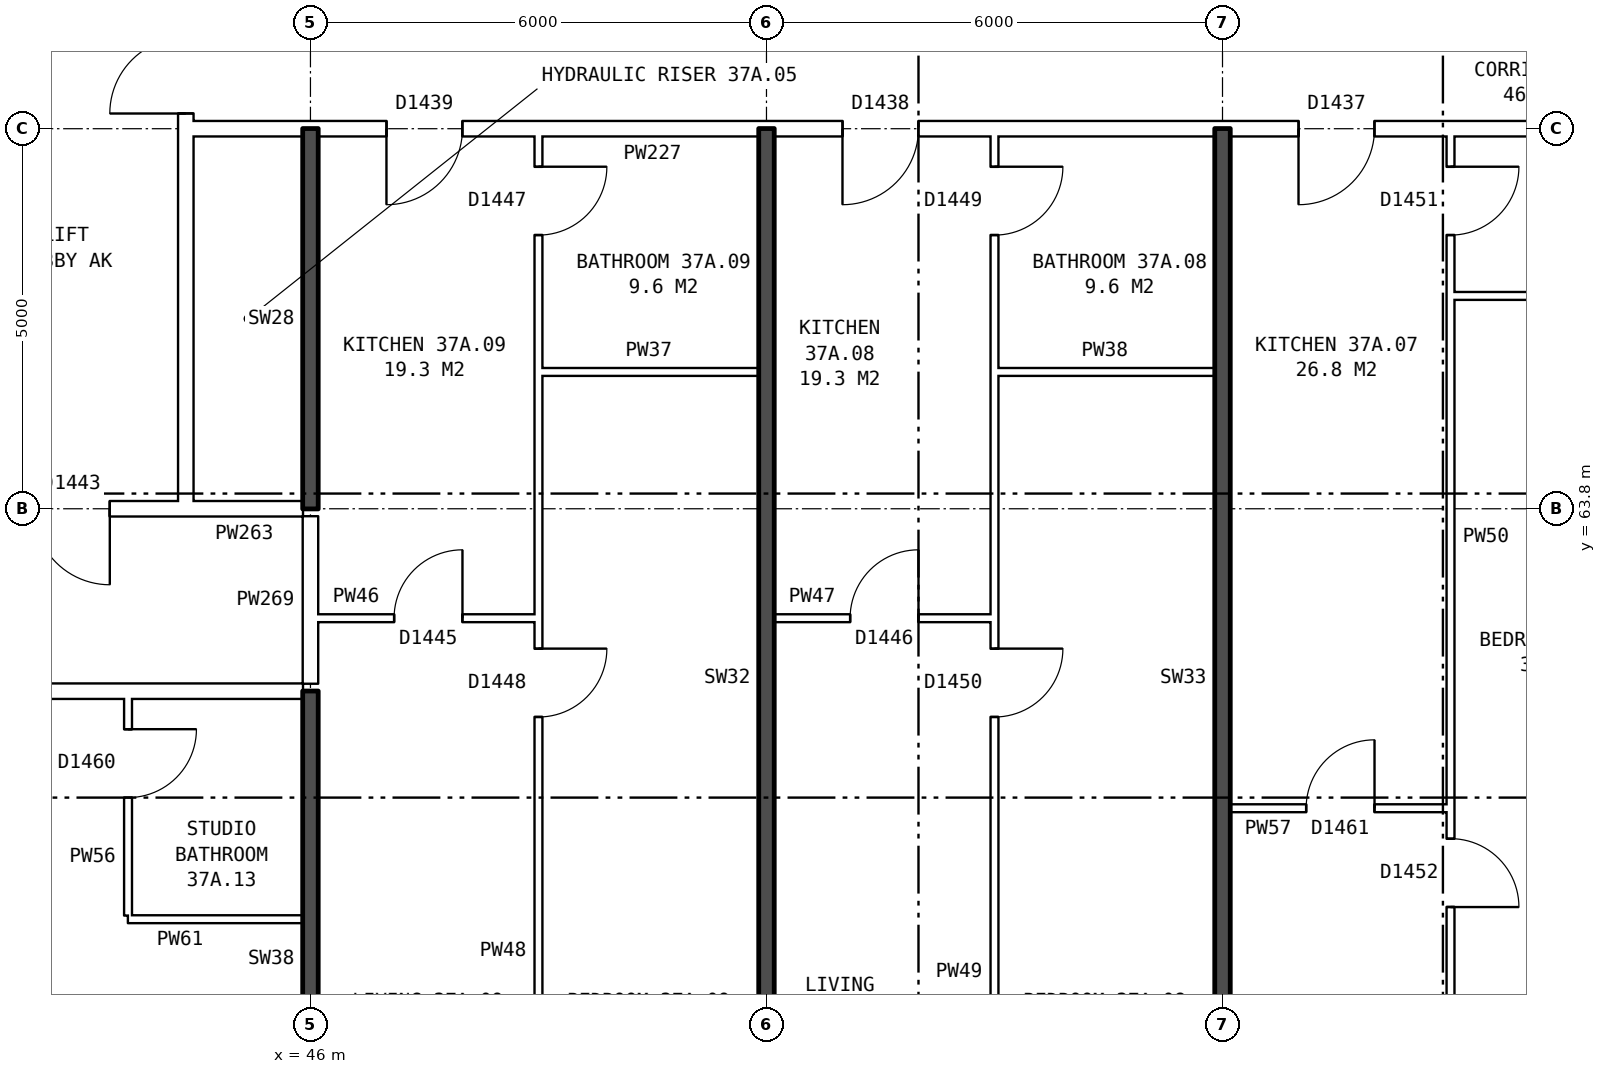
"""IFC4 building model, lengths in metres.
Left out: names, types, materials, properties, quantities, classifications, styles, units other than length and angle.
Written with IfcOpenShell. Run it as: python <this file> out.ifc"""

import sys

from ifc_helpers import new_model, si_unit, direction, frame, frame_2d, origin, place, context, subcontext, project, spatial, rectangle, extrude, element, fill, save


model = new_model("IFC4")
c1 = context("Model", 3, precision=1e-05, world=origin(), true_north=direction((0.0, 1.0)))
c2 = subcontext(c1, "Body", "Model", "MODEL_VIEW")
j1 = project(units=[si_unit("LENGTHUNIT", "METRE"), si_unit("PLANEANGLEUNIT", "RADIAN")], contexts=[c1])
p1 = place(None, origin())
s1 = spatial("IfcSite", under=j1, at=p1, CompositionType="ELEMENT")
p2 = place(p1, origin())
s2 = spatial("IfcBuilding", under=s1, at=p2, CompositionType="ELEMENT")
p3 = place(p2, frame((0.0, 0.0, 133.0)))
s3 = spatial("IfcBuildingStorey", under=s2, at=p3, CompositionType="ELEMENT", Elevation=133.0)
p4 = place(p3, frame((44.36, 63.9, 0.0), z_axis=(0.0, 0.0, 1.0), x_axis=(0.0, 1.0, 0.0)))
e1 = element("IfcWall", 1, at=p4, inside=s3, PredefinedType="PARTITIONING", context=c2, shape_type="SweptSolid", body=[
    extrude(rectangle(XDim=12.2, YDim=0.2, at=frame_2d((6.1, 0.0))), origin(), (0.0, 0.0, 1.0), 2.85),
])
p5 = place(p4, frame((5.1, 0.0, 0.0)))
e2 = element("IfcOpeningElement", 2, at=p5, cuts=e1, PredefinedType="OPENING", context=c2, shape_type="SweptSolid", body=[
    extrude(rectangle(XDim=2.0, YDim=2.1, at=frame_2d((1.0, 1.05))), frame((0.0, 0.11, 0.0), z_axis=(0.0, -1.0, 0.0), x_axis=(1.0, 0.0, 0.0)), (0.0, 0.0, 1.0), 0.22),
])
p6 = place(p3, frame((43.6, 58.4, 0.0), z_axis=(0.0, 0.0, 1.0), x_axis=(1.0, 0.0, 0.0)))
e3 = element("IfcWall", 3, at=p6, inside=s3, PredefinedType="PARTITIONING", context=c2, shape_type="SweptSolid", body=[
    extrude(rectangle(XDim=2.3, YDim=0.1, at=frame_2d((1.15, 0.0))), origin(), (0.0, 0.0, 1.0), 2.85),
])
p7 = place(p3, frame((58.1, 59.86, 0.0), z_axis=(0.0, 0.0, 1.0), x_axis=(1.0, 0.0, 0.0)))
e4 = element("IfcWall", 4, at=p7, inside=s3, PredefinedType="PARTITIONING", context=c2, shape_type="SweptSolid", body=[
    extrude(rectangle(XDim=2.9, YDim=0.1, at=frame_2d((1.45, 0.0))), origin(), (0.0, 0.0, 1.0), 2.85),
])
p8 = place(p7, frame((1.0, 0.0, 0.0)))
e5 = element("IfcOpeningElement", 5, at=p8, cuts=e4, PredefinedType="OPENING", context=c2, shape_type="SweptSolid", body=[
    extrude(rectangle(XDim=0.9, YDim=2.1, at=frame_2d((0.45, 1.05))), frame((0.0, 0.06, 0.0), z_axis=(0.0, -1.0, 0.0), x_axis=(1.0, 0.0, 0.0)), (0.0, 0.0, 1.0), 0.12),
])
p9 = place(p3, frame((27.11, 61.4, 0.0), z_axis=(0.0, 0.0, 1.0), x_axis=(1.0, 0.0, 0.0)))
e6 = element("IfcWall", 6, at=p9, inside=s3, PredefinedType="PARTITIONING", context=c2, shape_type="SweptSolid", body=[
    extrude(rectangle(XDim=18.79, YDim=0.2, at=frame_2d((9.395, 0.0))), origin(), (0.0, 0.0, 1.0), 2.85),
])
p10 = place(p9, frame((14.19, 0.0, 0.0)))
e7 = element("IfcOpeningElement", 7, at=p10, cuts=e6, PredefinedType="OPENING", context=c2, shape_type="SweptSolid", body=[
    extrude(rectangle(XDim=1.0, YDim=2.1, at=frame_2d((0.5, 1.05))), frame((0.0, 0.11, 0.0), z_axis=(0.0, -1.0, 0.0), x_axis=(1.0, 0.0, 0.0)), (0.0, 0.0, 1.0), 0.22),
])
p11 = place(p9, frame((8.19, 0.0, 0.0)))
e8 = element("IfcOpeningElement", 8, at=p11, cuts=e6, PredefinedType="OPENING", context=c2, shape_type="SweptSolid", body=[
    extrude(rectangle(XDim=1.0, YDim=2.1, at=frame_2d((0.5, 1.05))), frame((0.0, 0.11, 0.0), z_axis=(0.0, -1.0, 0.0), x_axis=(1.0, 0.0, 0.0)), (0.0, 0.0, 1.0), 0.22),
])
p12 = place(p9, frame((4.59, 0.0, 0.0)))
e9 = element("IfcOpeningElement", 9, at=p12, cuts=e6, PredefinedType="OPENING", context=c2, shape_type="SweptSolid", body=[
    extrude(rectangle(XDim=1.0, YDim=2.1, at=frame_2d((0.5, 1.05))), frame((0.0, 0.11, 0.0), z_axis=(0.0, -1.0, 0.0), x_axis=(1.0, 0.0, 0.0)), (0.0, 0.0, 1.0), 0.22),
])
p13 = place(p3, frame((46.1, 62.36, 0.0), z_axis=(0.0, 0.0, 1.0), x_axis=(1.0, 0.0, 0.0)))
e10 = element("IfcWall", 10, at=p13, inside=s3, PredefinedType="PARTITIONING", context=c2, shape_type="SweptSolid", body=[
    extrude(rectangle(XDim=2.9, YDim=0.1, at=frame_2d((1.45, 0.0))), origin(), (0.0, 0.0, 1.0), 2.85),
])
p14 = place(p13, frame((1.0, 0.0, 0.0)))
e11 = element("IfcOpeningElement", 11, at=p14, cuts=e10, PredefinedType="OPENING", context=c2, shape_type="SweptSolid", body=[
    extrude(rectangle(XDim=0.9, YDim=2.1, at=frame_2d((0.45, 1.05))), frame((0.0, 0.06, 0.0), z_axis=(0.0, -1.0, 0.0), x_axis=(1.0, 0.0, 0.0)), (0.0, 0.0, 1.0), 0.12),
])
p15 = place(p3, frame((52.1, 62.36, 0.0), z_axis=(0.0, 0.0, 1.0), x_axis=(1.0, 0.0, 0.0)))
e12 = element("IfcWall", 12, at=p15, inside=s3, PredefinedType="PARTITIONING", context=c2, shape_type="SweptSolid", body=[
    extrude(rectangle(XDim=2.9, YDim=0.1, at=frame_2d((1.45, 0.0))), origin(), (0.0, 0.0, 1.0), 2.85),
])
p16 = place(p15, frame((1.0, 0.0, 0.0)))
e13 = element("IfcOpeningElement", 13, at=p16, cuts=e12, PredefinedType="OPENING", context=c2, shape_type="SweptSolid", body=[
    extrude(rectangle(XDim=0.9, YDim=2.1, at=frame_2d((0.45, 1.05))), frame((0.0, 0.06, 0.0), z_axis=(0.0, -1.0, 0.0), x_axis=(1.0, 0.0, 0.0)), (0.0, 0.0, 1.0), 0.12),
])
p17 = place(p3, frame((41.36, 63.8, 0.0), z_axis=(0.0, 0.0, 1.0), x_axis=(1.0, 0.0, 0.0)))
e14 = element("IfcWall", 14, at=p17, inside=s3, PredefinedType="PARTITIONING", context=c2, shape_type="SweptSolid", body=[
    extrude(rectangle(XDim=3.0, YDim=0.2, at=frame_2d((1.5, 0.0))), origin(), (0.0, 0.0, 1.0), 2.85),
])
p18 = place(p17, frame((1.0, 0.0, 0.0)))
e15 = element("IfcOpeningElement", 15, at=p18, cuts=e14, PredefinedType="OPENING", context=c2, shape_type="SweptSolid", body=[
    extrude(rectangle(XDim=1.0, YDim=2.1, at=frame_2d((0.5, 1.05))), frame((0.0, 0.11, 0.0), z_axis=(0.0, -1.0, 0.0), x_axis=(1.0, 0.0, 0.0)), (0.0, 0.0, 1.0), 0.22),
])
p19 = place(p3, frame((44.36, 63.8, 0.0), z_axis=(0.0, 0.0, 1.0), x_axis=(1.0, 0.0, 0.0)))
e16 = element("IfcWall", 16, at=p19, inside=s3, PredefinedType="PARTITIONING", context=c2, shape_type="SweptSolid", body=[
    extrude(rectangle(XDim=1.54, YDim=0.2, at=frame_2d((0.77, 0.0))), origin(), (0.0, 0.0, 1.0), 2.85),
])
for number, where, z_axis, x_axis in (
    (17, (49.0, 65.6, 0.0), (0.0, 0.0, 1.0), (1.0, 0.0, 0.0)),
    (18, (55.0, 65.6, 0.0), (0.0, 0.0, 1.0), (1.0, 0.0, 0.0)),
):
    element("IfcWall", number, at=place(p3, frame(where, z_axis=z_axis, x_axis=x_axis)), inside=s3, PredefinedType="PARTITIONING", context=c2, shape_type="SweptSolid", body=[
        extrude(rectangle(XDim=2.9, YDim=0.1, at=frame_2d((1.45, 0.0))), origin(), (0.0, 0.0, 1.0), 2.85),
    ])
p20 = place(p3, frame((61.0, 66.6, 0.0), z_axis=(0.0, 0.0, 1.0), x_axis=(1.0, 0.0, 0.0)))
e19 = element("IfcWall", 19, at=p20, inside=s3, PredefinedType="PARTITIONING", context=c2, shape_type="SweptSolid", body=[
    extrude(rectangle(XDim=2.64, YDim=0.1, at=frame_2d((1.32, 0.0))), origin(), (0.0, 0.0, 1.0), 2.85),
])
p21 = place(p3, frame((44.36, 68.8, 0.0), z_axis=(0.0, 0.0, 1.0), x_axis=(1.0, 0.0, 0.0)))
e20 = element("IfcWall", 20, at=p21, inside=s3, PredefinedType="PARTITIONING", context=c2, shape_type="SweptSolid", body=[
    extrude(rectangle(XDim=19.28, YDim=0.2, at=frame_2d((9.64, 0.0))), origin(), (0.0, 0.0, 1.0), 2.85),
])
p22 = place(p21, frame((14.64, 0.0, 0.0)))
e21 = element("IfcOpeningElement", 21, at=p22, cuts=e20, PredefinedType="OPENING", context=c2, shape_type="SweptSolid", body=[
    extrude(rectangle(XDim=1.0, YDim=2.1, at=frame_2d((0.5, 1.05))), frame((0.0, 0.11, 0.0), z_axis=(0.0, -1.0, 0.0), x_axis=(1.0, 0.0, 0.0)), (0.0, 0.0, 1.0), 0.22),
])
p23 = place(p21, frame((8.64, 0.0, 0.0)))
e22 = element("IfcOpeningElement", 22, at=p23, cuts=e20, PredefinedType="OPENING", context=c2, shape_type="SweptSolid", body=[
    extrude(rectangle(XDim=1.0, YDim=2.1, at=frame_2d((0.5, 1.05))), frame((0.0, 0.11, 0.0), z_axis=(0.0, -1.0, 0.0), x_axis=(1.0, 0.0, 0.0)), (0.0, 0.0, 1.0), 0.22),
])
p24 = place(p21, frame((2.64, 0.0, 0.0)))
e23 = element("IfcOpeningElement", 23, at=p24, cuts=e20, PredefinedType="OPENING", context=c2, shape_type="SweptSolid", body=[
    extrude(rectangle(XDim=1.0, YDim=2.1, at=frame_2d((0.5, 1.05))), frame((0.0, 0.11, 0.0), z_axis=(0.0, -1.0, 0.0), x_axis=(1.0, 0.0, 0.0)), (0.0, 0.0, 1.0), 0.22),
])
p25 = place(p3, frame((43.6, 58.45, 0.0), z_axis=(0.0, 0.0, 1.0), x_axis=(0.0, 1.0, 0.0)))
e24 = element("IfcWall", 24, at=p25, inside=s3, PredefinedType="PARTITIONING", context=c2, shape_type="SweptSolid", body=[
    extrude(rectangle(XDim=2.85, YDim=0.1, at=frame_2d((1.425, 0.0))), origin(), (0.0, 0.0, 1.0), 2.85),
])
p26 = place(p25, frame((1.55, 0.0, 0.0)))
e25 = element("IfcOpeningElement", 25, at=p26, cuts=e24, PredefinedType="OPENING", context=c2, shape_type="SweptSolid", body=[
    extrude(rectangle(XDim=0.9, YDim=2.1, at=frame_2d((0.45, 1.05))), frame((0.0, 0.06, 0.0), z_axis=(0.0, -1.0, 0.0), x_axis=(1.0, 0.0, 0.0)), (0.0, 0.0, 1.0), 0.12),
])
p27 = place(p3, frame((46.0, 54.36, 0.0), z_axis=(0.0, 0.0, 1.0), x_axis=(0.0, 1.0, 0.0)))
e26 = element("IfcWall", 26, at=p27, inside=s3, PredefinedType="SOLIDWALL", context=c2, shape_type="SweptSolid", body=[
    extrude(rectangle(XDim=7.04, YDim=0.2, at=frame_2d((3.52, 0.0))), origin(), (0.0, 0.0, 1.0), 2.85),
])
p28 = place(p3, frame((46.0, 61.5, 0.0), z_axis=(0.0, 0.0, 1.0), x_axis=(0.0, 1.0, 0.0)))
e27 = element("IfcWall", 27, at=p28, inside=s3, PredefinedType="PARTITIONING", context=c2, shape_type="SweptSolid", body=[
    extrude(rectangle(XDim=2.2, YDim=0.2, at=frame_2d((1.1, 0.0))), origin(), (0.0, 0.0, 1.0), 2.85),
])
p29 = place(p3, frame((46.0, 63.8, 0.0), z_axis=(0.0, 0.0, 1.0), x_axis=(0.0, 1.0, 0.0)))
e28 = element("IfcWall", 28, at=p29, inside=s3, PredefinedType="SOLIDWALL", context=c2, shape_type="SweptSolid", body=[
    extrude(rectangle(XDim=5.0, YDim=0.2, at=frame_2d((2.5, 0.0))), origin(), (0.0, 0.0, 1.0), 2.85),
])
p30 = place(p3, frame((49.0, 54.36, 0.0), z_axis=(0.0, 0.0, 1.0), x_axis=(0.0, 1.0, 0.0)))
e29 = element("IfcWall", 29, at=p30, inside=s3, PredefinedType="PARTITIONING", context=c2, shape_type="SweptSolid", body=[
    extrude(rectangle(XDim=14.34, YDim=0.1, at=frame_2d((7.17, 0.0))), origin(), (0.0, 0.0, 1.0), 2.85),
])
p31 = place(p30, frame((6.7, 0.0, 0.0)))
e30 = element("IfcOpeningElement", 30, at=p31, cuts=e29, PredefinedType="OPENING", context=c2, shape_type="SweptSolid", body=[
    extrude(rectangle(XDim=0.9, YDim=2.1, at=frame_2d((0.45, 1.05))), frame((0.0, 0.06, 0.0), z_axis=(0.0, -1.0, 0.0), x_axis=(1.0, 0.0, 0.0)), (0.0, 0.0, 1.0), 0.12),
])
p32 = place(p30, frame((13.04, 0.0, 0.0)))
e31 = element("IfcOpeningElement", 31, at=p32, cuts=e29, PredefinedType="OPENING", context=c2, shape_type="SweptSolid", body=[
    extrude(rectangle(XDim=0.9, YDim=2.1, at=frame_2d((0.45, 1.05))), frame((0.0, 0.06, 0.0), z_axis=(0.0, -1.0, 0.0), x_axis=(1.0, 0.0, 0.0)), (0.0, 0.0, 1.0), 0.12),
])
p33 = place(p3, frame((52.0, 54.36, 0.0), z_axis=(0.0, 0.0, 1.0), x_axis=(0.0, 1.0, 0.0)))
e32 = element("IfcWall", 32, at=p33, inside=s3, PredefinedType="SOLIDWALL", context=c2, shape_type="SweptSolid", body=[
    extrude(rectangle(XDim=14.44, YDim=0.2, at=frame_2d((7.22, 0.0))), origin(), (0.0, 0.0, 1.0), 2.85),
])
p34 = place(p3, frame((55.0, 54.36, 0.0), z_axis=(0.0, 0.0, 1.0), x_axis=(0.0, 1.0, 0.0)))
e33 = element("IfcWall", 33, at=p34, inside=s3, PredefinedType="PARTITIONING", context=c2, shape_type="SweptSolid", body=[
    extrude(rectangle(XDim=14.34, YDim=0.1, at=frame_2d((7.17, 0.0))), origin(), (0.0, 0.0, 1.0), 2.85),
])
p35 = place(p34, frame((6.7, 0.0, 0.0)))
e34 = element("IfcOpeningElement", 34, at=p35, cuts=e33, PredefinedType="OPENING", context=c2, shape_type="SweptSolid", body=[
    extrude(rectangle(XDim=0.9, YDim=2.1, at=frame_2d((0.45, 1.05))), frame((0.0, 0.06, 0.0), z_axis=(0.0, -1.0, 0.0), x_axis=(1.0, 0.0, 0.0)), (0.0, 0.0, 1.0), 0.12),
])
p36 = place(p34, frame((13.04, 0.0, 0.0)))
e35 = element("IfcOpeningElement", 35, at=p36, cuts=e33, PredefinedType="OPENING", context=c2, shape_type="SweptSolid", body=[
    extrude(rectangle(XDim=0.9, YDim=2.1, at=frame_2d((0.45, 1.05))), frame((0.0, 0.06, 0.0), z_axis=(0.0, -1.0, 0.0), x_axis=(1.0, 0.0, 0.0)), (0.0, 0.0, 1.0), 0.12),
])
p37 = place(p3, frame((58.0, 54.36, 0.0), z_axis=(0.0, 0.0, 1.0), x_axis=(0.0, 1.0, 0.0)))
e36 = element("IfcWall", 36, at=p37, inside=s3, PredefinedType="SOLIDWALL", context=c2, shape_type="SweptSolid", body=[
    extrude(rectangle(XDim=14.44, YDim=0.2, at=frame_2d((7.22, 0.0))), origin(), (0.0, 0.0, 1.0), 2.85),
])
p38 = place(p3, frame((61.0, 54.36, 0.0), z_axis=(0.0, 0.0, 1.0), x_axis=(0.0, 1.0, 0.0)))
e37 = element("IfcWall", 37, at=p38, inside=s3, PredefinedType="PARTITIONING", context=c2, shape_type="SweptSolid", body=[
    extrude(rectangle(XDim=14.34, YDim=0.1, at=frame_2d((7.17, 0.0))), origin(), (0.0, 0.0, 1.0), 2.85),
])
p39 = place(p38, frame((4.2, 0.0, 0.0)))
e38 = element("IfcOpeningElement", 38, at=p39, cuts=e37, PredefinedType="OPENING", context=c2, shape_type="SweptSolid", body=[
    extrude(rectangle(XDim=0.9, YDim=2.1, at=frame_2d((0.45, 1.05))), frame((0.0, 0.06, 0.0), z_axis=(0.0, -1.0, 0.0), x_axis=(1.0, 0.0, 0.0)), (0.0, 0.0, 1.0), 0.12),
])
p40 = place(p38, frame((13.04, 0.0, 0.0)))
e39 = element("IfcOpeningElement", 39, at=p40, cuts=e37, PredefinedType="OPENING", context=c2, shape_type="SweptSolid", body=[
    extrude(rectangle(XDim=0.9, YDim=2.1, at=frame_2d((0.45, 1.05))), frame((0.0, 0.06, 0.0), z_axis=(0.0, -1.0, 0.0), x_axis=(1.0, 0.0, 0.0)), (0.0, 0.0, 1.0), 0.12),
])
p41 = place(p5, origin())
e40 = element("IfcDoor", 40, at=p41, inside=s3, OperationType="DOUBLE_DOOR_SINGLE_SWING", PredefinedType="DOOR", context=c2, shape_type="SweptSolid", body=[
    extrude(rectangle(XDim=2.0, YDim=2.1, at=frame_2d((1.0, 1.05))), frame((0.0, 0.025, 0.0), z_axis=(0.0, -1.0, 0.0), x_axis=(1.0, 0.0, 0.0)), (0.0, 0.0, 1.0), 0.05),
])
fill(e2, e40)
p42 = place(p18, frame((1.0, 0.0, 0.0), z_axis=(0.0, 0.0, 1.0), x_axis=(-1.0, 0.0, 0.0)))
e41 = element("IfcDoor", 41, at=p42, inside=s3, OperationType="SINGLE_SWING_LEFT", PredefinedType="DOOR", context=c2, shape_type="SweptSolid", body=[
    extrude(rectangle(XDim=1.0, YDim=2.1, at=frame_2d((0.5, 1.05))), frame((0.0, 0.025, 0.0), z_axis=(0.0, -1.0, 0.0), x_axis=(1.0, 0.0, 0.0)), (0.0, 0.0, 1.0), 0.05),
])
fill(e15, e41)
p43 = place(p39, frame((0.9, 0.0, 0.0), z_axis=(0.0, 0.0, 1.0), x_axis=(-1.0, 0.0, 0.0)))
e42 = element("IfcDoor", 42, at=p43, inside=s3, OperationType="SINGLE_SWING_RIGHT", PredefinedType="DOOR", context=c2, shape_type="SweptSolid", body=[
    extrude(rectangle(XDim=0.9, YDim=2.1, at=frame_2d((0.45, 1.05))), frame((0.0, 0.025, 0.0), z_axis=(0.0, -1.0, 0.0), x_axis=(1.0, 0.0, 0.0)), (0.0, 0.0, 1.0), 0.05),
])
fill(e38, e42)
p44 = place(p22, frame((1.0, 0.0, 0.0), z_axis=(0.0, 0.0, 1.0), x_axis=(-1.0, 0.0, 0.0)))
e43 = element("IfcDoor", 43, at=p44, inside=s3, OperationType="SINGLE_SWING_RIGHT", PredefinedType="DOOR", context=c2, shape_type="SweptSolid", body=[
    extrude(rectangle(XDim=1.0, YDim=2.1, at=frame_2d((0.5, 1.05))), frame((0.0, 0.025, 0.0), z_axis=(0.0, -1.0, 0.0), x_axis=(1.0, 0.0, 0.0)), (0.0, 0.0, 1.0), 0.05),
])
fill(e21, e43)
p45 = place(p8, origin())
e44 = element("IfcDoor", 44, at=p45, inside=s3, OperationType="SINGLE_SWING_RIGHT", PredefinedType="DOOR", context=c2, shape_type="SweptSolid", body=[
    extrude(rectangle(XDim=0.9, YDim=2.1, at=frame_2d((0.45, 1.05))), frame((0.0, 0.025, 0.0), z_axis=(0.0, -1.0, 0.0), x_axis=(1.0, 0.0, 0.0)), (0.0, 0.0, 1.0), 0.05),
])
fill(e5, e44)
p46 = place(p40, frame((0.9, 0.0, 0.0), z_axis=(0.0, 0.0, 1.0), x_axis=(-1.0, 0.0, 0.0)))
e45 = element("IfcDoor", 45, at=p46, inside=s3, OperationType="SINGLE_SWING_LEFT", PredefinedType="DOOR", context=c2, shape_type="SweptSolid", body=[
    extrude(rectangle(XDim=0.9, YDim=2.1, at=frame_2d((0.45, 1.05))), frame((0.0, 0.025, 0.0), z_axis=(0.0, -1.0, 0.0), x_axis=(1.0, 0.0, 0.0)), (0.0, 0.0, 1.0), 0.05),
])
fill(e39, e45)
p47 = place(p35, frame((0.9, 0.0, 0.0), z_axis=(0.0, 0.0, 1.0), x_axis=(-1.0, 0.0, 0.0)))
e46 = element("IfcDoor", 46, at=p47, inside=s3, OperationType="SINGLE_SWING_LEFT", PredefinedType="DOOR", context=c2, shape_type="SweptSolid", body=[
    extrude(rectangle(XDim=0.9, YDim=2.1, at=frame_2d((0.45, 1.05))), frame((0.0, 0.025, 0.0), z_axis=(0.0, -1.0, 0.0), x_axis=(1.0, 0.0, 0.0)), (0.0, 0.0, 1.0), 0.05),
])
fill(e34, e46)
p48 = place(p23, frame((1.0, 0.0, 0.0), z_axis=(0.0, 0.0, 1.0), x_axis=(-1.0, 0.0, 0.0)))
e47 = element("IfcDoor", 47, at=p48, inside=s3, OperationType="SINGLE_SWING_RIGHT", PredefinedType="DOOR", context=c2, shape_type="SweptSolid", body=[
    extrude(rectangle(XDim=1.0, YDim=2.1, at=frame_2d((0.5, 1.05))), frame((0.0, 0.025, 0.0), z_axis=(0.0, -1.0, 0.0), x_axis=(1.0, 0.0, 0.0)), (0.0, 0.0, 1.0), 0.05),
])
fill(e22, e47)
p49 = place(p16, origin())
e48 = element("IfcDoor", 48, at=p49, inside=s3, OperationType="SINGLE_SWING_RIGHT", PredefinedType="DOOR", context=c2, shape_type="SweptSolid", body=[
    extrude(rectangle(XDim=0.9, YDim=2.1, at=frame_2d((0.45, 1.05))), frame((0.0, 0.025, 0.0), z_axis=(0.0, -1.0, 0.0), x_axis=(1.0, 0.0, 0.0)), (0.0, 0.0, 1.0), 0.05),
])
fill(e13, e48)
p50 = place(p36, frame((0.9, 0.0, 0.0), z_axis=(0.0, 0.0, 1.0), x_axis=(-1.0, 0.0, 0.0)))
e49 = element("IfcDoor", 49, at=p50, inside=s3, OperationType="SINGLE_SWING_LEFT", PredefinedType="DOOR", context=c2, shape_type="SweptSolid", body=[
    extrude(rectangle(XDim=0.9, YDim=2.1, at=frame_2d((0.45, 1.05))), frame((0.0, 0.025, 0.0), z_axis=(0.0, -1.0, 0.0), x_axis=(1.0, 0.0, 0.0)), (0.0, 0.0, 1.0), 0.05),
])
fill(e35, e49)
p51 = place(p31, frame((0.9, 0.0, 0.0), z_axis=(0.0, 0.0, 1.0), x_axis=(-1.0, 0.0, 0.0)))
e50 = element("IfcDoor", 50, at=p51, inside=s3, OperationType="SINGLE_SWING_LEFT", PredefinedType="DOOR", context=c2, shape_type="SweptSolid", body=[
    extrude(rectangle(XDim=0.9, YDim=2.1, at=frame_2d((0.45, 1.05))), frame((0.0, 0.025, 0.0), z_axis=(0.0, -1.0, 0.0), x_axis=(1.0, 0.0, 0.0)), (0.0, 0.0, 1.0), 0.05),
])
fill(e30, e50)
p52 = place(p24, frame((1.0, 0.0, 0.0), z_axis=(0.0, 0.0, 1.0), x_axis=(-1.0, 0.0, 0.0)))
e51 = element("IfcDoor", 51, at=p52, inside=s3, OperationType="SINGLE_SWING_RIGHT", PredefinedType="DOOR", context=c2, shape_type="SweptSolid", body=[
    extrude(rectangle(XDim=1.0, YDim=2.1, at=frame_2d((0.5, 1.05))), frame((0.0, 0.025, 0.0), z_axis=(0.0, -1.0, 0.0), x_axis=(1.0, 0.0, 0.0)), (0.0, 0.0, 1.0), 0.05),
])
fill(e23, e51)
p53 = place(p14, origin())
e52 = element("IfcDoor", 52, at=p53, inside=s3, OperationType="SINGLE_SWING_RIGHT", PredefinedType="DOOR", context=c2, shape_type="SweptSolid", body=[
    extrude(rectangle(XDim=0.9, YDim=2.1, at=frame_2d((0.45, 1.05))), frame((0.0, 0.025, 0.0), z_axis=(0.0, -1.0, 0.0), x_axis=(1.0, 0.0, 0.0)), (0.0, 0.0, 1.0), 0.05),
])
fill(e11, e52)
p54 = place(p32, frame((0.9, 0.0, 0.0), z_axis=(0.0, 0.0, 1.0), x_axis=(-1.0, 0.0, 0.0)))
e53 = element("IfcDoor", 53, at=p54, inside=s3, OperationType="SINGLE_SWING_LEFT", PredefinedType="DOOR", context=c2, shape_type="SweptSolid", body=[
    extrude(rectangle(XDim=0.9, YDim=2.1, at=frame_2d((0.45, 1.05))), frame((0.0, 0.025, 0.0), z_axis=(0.0, -1.0, 0.0), x_axis=(1.0, 0.0, 0.0)), (0.0, 0.0, 1.0), 0.05),
])
fill(e31, e53)
p55 = place(p26, frame((0.9, 0.0, 0.0), z_axis=(0.0, 0.0, 1.0), x_axis=(-1.0, 0.0, 0.0)))
e54 = element("IfcDoor", 54, at=p55, inside=s3, OperationType="SINGLE_SWING_LEFT", PredefinedType="DOOR", context=c2, shape_type="SweptSolid", body=[
    extrude(rectangle(XDim=0.9, YDim=2.1, at=frame_2d((0.45, 1.05))), frame((0.0, 0.025, 0.0), z_axis=(0.0, -1.0, 0.0), x_axis=(1.0, 0.0, 0.0)), (0.0, 0.0, 1.0), 0.05),
])
fill(e25, e54)
save(model, sys.argv[1])
